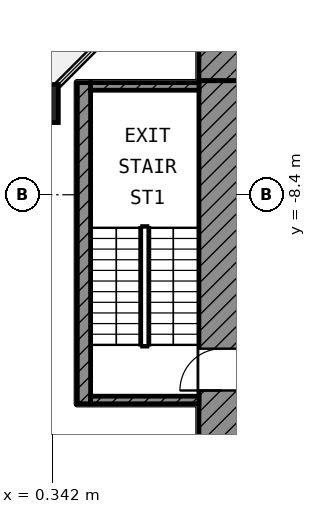
"""IFC4 building model, lengths in metres.
Left out: names, types, materials, properties, quantities, classifications, styles, units other than length and angle.
Written with IfcOpenShell. Run it as: python <this file> out.ifc"""

import sys

from ifc_helpers import new_model, si_unit, direction, frame, frame_2d, origin, origin_2d, place, context, subcontext, project, spatial, rectangle, extrude, element, fill, save


model = new_model("IFC4")
c1 = context("Model", 3, precision=1e-05, world=origin(), true_north=direction((0.0, 1.0)))
c2 = subcontext(c1, "Body", "Model", "MODEL_VIEW")
j1 = project(units=[si_unit("LENGTHUNIT", "METRE"), si_unit("PLANEANGLEUNIT", "RADIAN")], contexts=[c1])
p1 = place(None, origin())
s1 = spatial("IfcSite", under=j1, at=p1, CompositionType="ELEMENT")
p2 = place(p1, origin())
s2 = spatial("IfcBuilding", under=s1, at=p2, CompositionType="ELEMENT")
p3 = place(p2, frame((0.0, 0.0, 192.0)))
s3 = spatial("IfcBuildingStorey", under=s2, at=p3, CompositionType="ELEMENT", Elevation=192.0)
p4 = place(p3, frame((0.0, -6.0, 0.0), z_axis=(0.0, 0.0, 1.0), x_axis=(1.0, 0.0, 0.0)))
e1 = element("IfcColumn", 1, at=p4, inside=s3, PredefinedType="COLUMN", context=c2, shape_type="SweptSolid", body=[
    extrude(rectangle(XDim=1.0, YDim=1.0, at=origin_2d()), origin(), (0.0, 0.0, 1.0), 4.2),
])
p5 = place(p3, frame((4.2, -4.8, 0.0), z_axis=(0.0, 0.0, 1.0), x_axis=(1.0, 0.0, 0.0)))
e2 = element("IfcWall", 2, at=p5, inside=s3, PredefinedType="SHEAR", context=c2, shape_type="SweptSolid", body=[
    extrude(rectangle(XDim=20.7, YDim=1.2, at=frame_2d((10.35, 0.0))), origin(), (0.0, 0.0, 1.0), 3.6),
])
p6 = place(p5, frame((1.95, 0.0, 0.0)))
e3 = element("IfcOpeningElement", 3, at=p6, cuts=e2, PredefinedType="OPENING", context=c2, shape_type="SweptSolid", body=[
    extrude(rectangle(XDim=1.1, YDim=2.1, at=frame_2d((0.55, 1.05))), frame((0.0, 0.61, 0.0), z_axis=(0.0, -1.0, 0.0), x_axis=(1.0, 0.0, 0.0)), (0.0, 0.0, 1.0), 1.22),
])
p7 = place(p5, frame((17.95, 0.0, 0.0)))
e4 = element("IfcOpeningElement", 4, at=p7, cuts=e2, PredefinedType="OPENING", context=c2, shape_type="SweptSolid", body=[
    extrude(rectangle(XDim=1.1, YDim=2.1, at=frame_2d((0.55, 1.05))), frame((0.0, 0.61, 0.0), z_axis=(0.0, -1.0, 0.0), x_axis=(1.0, 0.0, 0.0)), (0.0, 0.0, 1.0), 1.22),
])
p8 = place(p3, frame((4.8, -24.9, 0.0), z_axis=(0.0, 0.0, 1.0), x_axis=(0.0, 1.0, 0.0)))
e5 = element("IfcWall", 5, at=p8, inside=s3, PredefinedType="SHEAR", context=c2, shape_type="SweptSolid", body=[
    extrude(rectangle(XDim=19.5, YDim=1.2, at=frame_2d((9.75, 0.0))), origin(), (0.0, 0.0, 1.0), 3.6),
])
p9 = place(p8, frame((11.35, 0.0, 0.0)))
e6 = element("IfcOpeningElement", 6, at=p9, cuts=e5, PredefinedType="OPENING", context=c2, shape_type="SweptSolid", body=[
    extrude(rectangle(XDim=1.1, YDim=2.1, at=frame_2d((0.55, 1.05))), frame((0.0, 0.61, 0.0), z_axis=(0.0, -1.0, 0.0), x_axis=(1.0, 0.0, 0.0)), (0.0, 0.0, 1.0), 1.22),
])
p10 = place(p8, frame((2.05, 0.0, 0.0)))
e7 = element("IfcOpeningElement", 7, at=p10, cuts=e5, PredefinedType="OPENING", context=c2, shape_type="SweptSolid", body=[
    extrude(rectangle(XDim=1.1, YDim=2.1, at=frame_2d((0.55, 1.05))), frame((0.0, 0.61, 0.0), z_axis=(0.0, -1.0, 0.0), x_axis=(1.0, 0.0, 0.0)), (0.0, 0.0, 1.0), 1.22),
])
p11 = place(p3, frame((1.175, -13.9, 0.0), z_axis=(0.0, 0.0, 1.0), x_axis=(0.0, 1.0, 0.0)))
e8 = element("IfcWall", 8, at=p11, inside=s3, PredefinedType="SHEAR", context=c2, shape_type="SweptSolid", body=[
    extrude(rectangle(XDim=8.45, YDim=0.35, at=frame_2d((4.225, 0.0))), origin(), (0.0, 0.0, 1.0), 3.6),
])
for number, where, z_axis, x_axis in (
    (9, (1.35, -5.55, 0.0), (0.0, 0.0, 1.0), (1.0, 0.0, 0.0)),
    (10, (1.35, -13.8, 0.0), (0.0, 0.0, 1.0), (1.0, 0.0, 0.0)),
):
    element("IfcWall", number, at=place(p3, frame(where, z_axis=z_axis, x_axis=x_axis)), inside=s3, PredefinedType="SHEAR", context=c2, shape_type="SweptSolid", body=[
        extrude(rectangle(XDim=2.85, YDim=0.2, at=frame_2d((1.425, 0.0))), origin(), (0.0, 0.0, 1.0), 3.6),
    ])
p12 = place(p9, origin())
e11 = element("IfcDoor", 11, at=p12, inside=s3, OperationType="SINGLE_SWING_LEFT", PredefinedType="DOOR", context=c2, shape_type="SweptSolid", body=[
    extrude(rectangle(XDim=1.1, YDim=2.1, at=frame_2d((0.55, 1.05))), frame((0.0, 0.025, 0.0), z_axis=(0.0, -1.0, 0.0), x_axis=(1.0, 0.0, 0.0)), (0.0, 0.0, 1.0), 0.05),
])
fill(e6, e11)
save(model, sys.argv[1])
